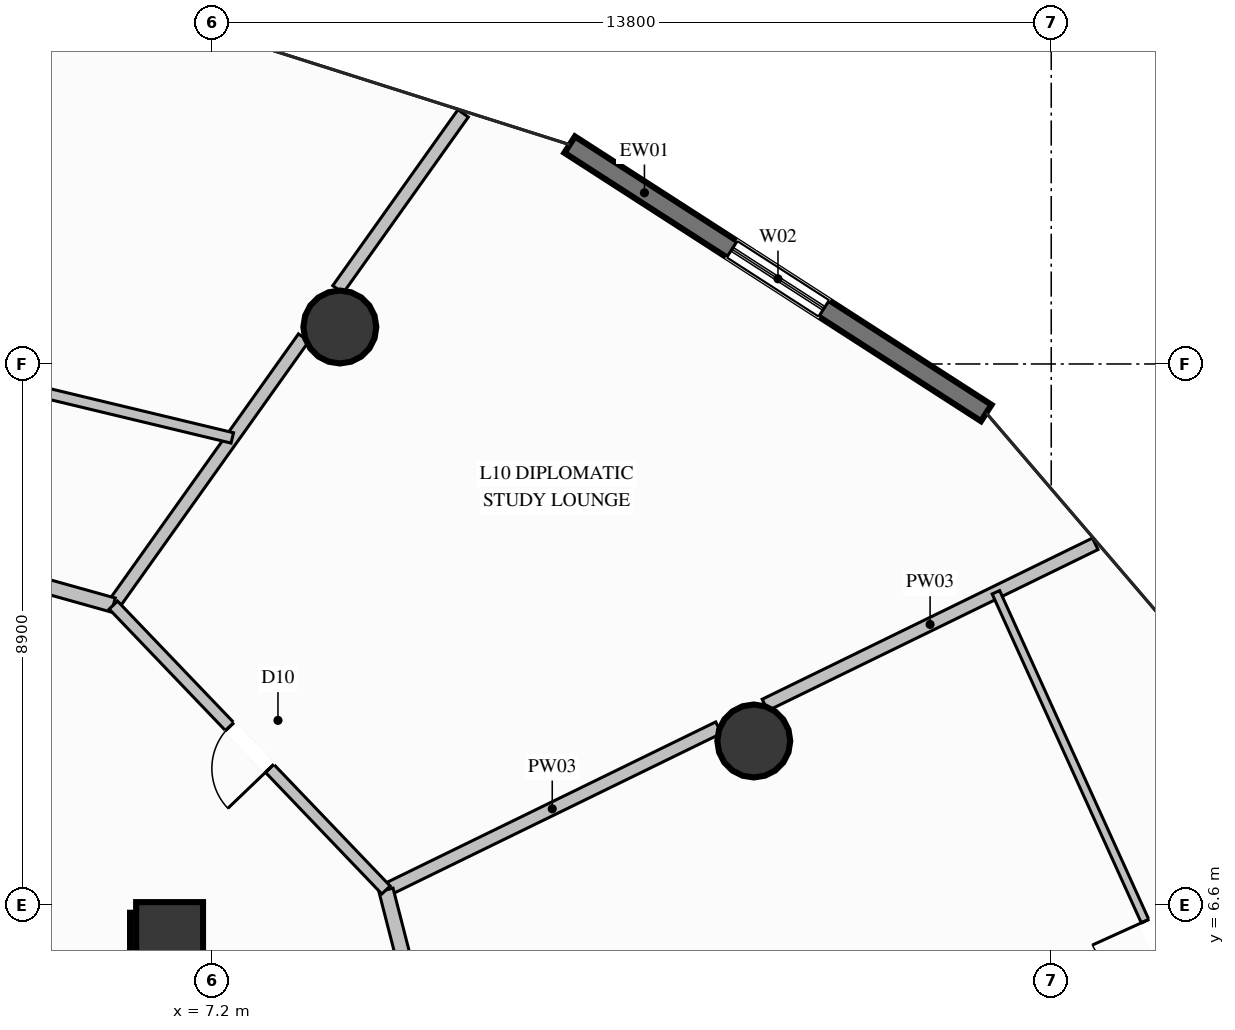
"""IFC4 building model, lengths in metres.
Left out: names, types, materials, properties, quantities, classifications, styles, units other than length and angle.
Written with IfcOpenShell. Run it as: python <this file> out.ifc"""

import sys

from ifc_helpers import new_model, si_unit, direction, frame, frame_2d, origin, origin_2d, place, context, subcontext, project, spatial, rectangle, circle, extrude, element, fill, save


model = new_model("IFC4")
c1 = context("Model", 3, precision=1e-05, world=origin(), true_north=direction((0.0, 1.0)))
c2 = subcontext(c1, "Body", "Model", "MODEL_VIEW")
j1 = project(units=[si_unit("LENGTHUNIT", "METRE"), si_unit("PLANEANGLEUNIT", "RADIAN")], contexts=[c1])
p1 = place(None, origin())
s1 = spatial("IfcSite", under=j1, at=p1, CompositionType="ELEMENT")
p2 = place(p1, origin())
s2 = spatial("IfcBuilding", under=s1, at=p2, CompositionType="ELEMENT")
p3 = place(p2, frame((0.0, 0.0, 46.4)))
s3 = spatial("IfcBuildingStorey", under=s2, at=p3, CompositionType="ELEMENT", Elevation=46.4)
p4 = place(p3, frame((6.5, 6.1, 0.0), z_axis=(0.0, 0.0, 1.0), x_axis=(1.0, 0.0, 0.0)))
e1 = element("IfcColumn", 1, at=p4, inside=s3, PredefinedType="COLUMN", context=c2, shape_type="SweptSolid", body=[
    extrude(rectangle(XDim=1.1, YDim=1.1, at=origin_2d()), origin(), (0.0, 0.0, 1.0), 3.6),
])
p5 = place(p3, frame((5.85, 6.1, 0.0), z_axis=(0.0, 0.0, 1.0), x_axis=(1.0, 0.0, 0.0)))
e2 = element("IfcWall", 2, at=p5, inside=s3, PredefinedType="SHEAR", context=c2, shape_type="SweptSolid", body=[
    extrude(rectangle(XDim=0.275, YDim=0.75, at=frame_2d((0.137, 0.0))), origin(), (0.0, 0.0, 1.0), 3.6),
])
p6 = place(p3, frame((6.5, 3.35, 0.0), z_axis=(0.0, 0.0, 1.0), x_axis=(0.0, 1.0, 0.0)))
e3 = element("IfcWall", 3, at=p6, inside=s3, PredefinedType="SHEAR", context=c2, shape_type="SweptSolid", body=[
    extrude(rectangle(XDim=3.125, YDim=0.75, at=frame_2d((1.562, 0.0))), origin(), (0.0, 0.0, 1.0), 3.6),
])
for number, where, z_axis, x_axis in (
    (4, (16.108, 9.3, 0.0), (0.0, 0.0, 1.0), (1.0, 0.0, 0.0)),
    (5, (9.3, 16.108, 0.0), (0.0, 0.0, 1.0), (1.0, 0.0, 0.0)),
):
    element("IfcColumn", number, at=place(p3, frame(where, z_axis=z_axis, x_axis=x_axis)), inside=s3, PredefinedType="COLUMN", context=c2, shape_type="SweptSolid", body=[
        extrude(circle(Radius=0.6, at=origin_2d()), origin(), (0.0, 0.0, 1.0), 3.6),
    ])
p7 = place(p3, frame((13.08, 19.107, 0.0), z_axis=(0.0, 0.0, 1.0), x_axis=(0.840690454994, -0.541515982111, 0.0)))
e6 = element("IfcWall", 6, at=p7, inside=s3, PredefinedType="SOLIDWALL", context=c2, shape_type="SweptSolid", body=[
    extrude(rectangle(XDim=8.149, YDim=0.32, at=frame_2d((4.075, 0.0))), origin(), (0.0, 0.0, 1.0), 3.34),
])
p8 = place(p7, frame((3.175, 0.0, 0.35)))
e7 = element("IfcOpeningElement", 7, at=p8, cuts=e6, PredefinedType="OPENING", context=c2, shape_type="SweptSolid", body=[
    extrude(rectangle(XDim=1.8, YDim=2.6, at=frame_2d((0.9, 1.3))), frame((0.0, 0.17, 0.0), z_axis=(0.0, -1.0, 0.0), x_axis=(1.0, 0.0, 0.0)), (0.0, 0.0, 1.0), 0.34),
])
p9 = place(p3, frame((10.059, 6.85, 0.0), z_axis=(0.0, 0.0, 1.0), x_axis=(0.898694403509, 0.438575385883, 0.0)))
e8 = element("IfcWall", 8, at=p9, inside=s3, PredefinedType="PARTITIONING", context=c2, shape_type="SweptSolid", body=[
    extrude(rectangle(XDim=6.085, YDim=0.21, at=frame_2d((3.043, 0.0))), origin(), (0.0, 0.0, 1.0), 2.709),
])
p10 = place(p3, frame((16.292, 9.892, 0.0), z_axis=(0.0, 0.0, 1.0), x_axis=(0.898724176439, 0.438514372266, 0.0)))
e9 = element("IfcWall", 9, at=p10, inside=s3, PredefinedType="PARTITIONING", context=c2, shape_type="SweptSolid", body=[
    extrude(rectangle(XDim=6.043, YDim=0.21, at=frame_2d((3.021, 0.0))), origin(), (0.0, 0.0, 1.0), 3.34),
])
p11 = place(p3, frame((5.575, 11.535, 0.0), z_axis=(0.0, 0.0, 1.0), x_axis=(0.579748671229, 0.814795359712, 0.0)))
e10 = element("IfcWall", 10, at=p11, inside=s3, PredefinedType="PARTITIONING", context=c2, shape_type="SweptSolid", body=[
    extrude(rectangle(XDim=5.399, YDim=0.21, at=frame_2d((2.7, 0.0))), origin(), (0.0, 0.0, 1.0), 2.709),
])
p12 = place(p3, frame((9.269, 16.727, 0.0), z_axis=(0.0, 0.0, 1.0), x_axis=(0.579683056025, 0.814842042704, 0.0)))
e11 = element("IfcWall", 11, at=p12, inside=s3, PredefinedType="PARTITIONING", context=c2, shape_type="SweptSolid", body=[
    extrude(rectangle(XDim=3.552, YDim=0.21, at=frame_2d((1.776, 0.0))), origin(), (0.0, 0.0, 1.0), 3.34),
])
p13 = place(p3, frame((5.575, 11.535, 0.0), z_axis=(0.0, 0.0, 1.0), x_axis=(-0.962983004146, 0.269562114782, 0.0)))
e12 = element("IfcWall", 12, at=p13, inside=s3, PredefinedType="PARTITIONING", context=c2, shape_type="SweptSolid", body=[
    extrude(rectangle(XDim=2.671, YDim=0.24, at=frame_2d((1.335, 0.0))), origin(), (0.0, 0.0, 1.0), 3.34),
])
p14 = place(p3, frame((7.531, 14.284, 0.0), z_axis=(0.0, 0.0, 1.0), x_axis=(-0.972350237733, 0.233527332836, 0.0)))
e13 = element("IfcWall", 13, at=p14, inside=s3, PredefinedType="PLUMBINGWALL", context=c2, shape_type="SweptSolid", body=[
    extrude(rectangle(XDim=3.409, YDim=0.175, at=frame_2d((1.705, 0.0))), origin(), (0.0, 0.0, 1.0), 3.34),
])
p15 = place(p3, frame((11.7, 0.45, 0.0), z_axis=(0.0, 0.0, 1.0), x_axis=(-0.248347790771, 0.968670932164, 0.0)))
e14 = element("IfcWall", 14, at=p15, inside=s3, PredefinedType="PARTITIONING", context=c2, shape_type="SweptSolid", body=[
    extrude(rectangle(XDim=6.607, YDim=0.24, at=frame_2d((3.304, 0.0))), origin(), (0.0, 0.0, 1.0), 3.34),
])
p16 = place(p3, frame((25.388, 0.063, 0.0), z_axis=(0.0, 0.0, 1.0), x_axis=(-0.413014096603, 0.910724632371, 0.0)))
e15 = element("IfcWall", 15, at=p16, inside=s3, PredefinedType="PARTITIONING", context=c2, shape_type="SweptSolid", body=[
    extrude(rectangle(XDim=12.827, YDim=0.135, at=frame_2d((6.414, 0.0))), origin(), (0.0, 0.0, 1.0), 3.34),
])
p17 = place(p16, frame((5.939, 0.0, 0.0)))
e16 = element("IfcOpeningElement", 16, at=p17, cuts=e15, PredefinedType="OPENING", context=c2, shape_type="SweptSolid", body=[
    extrude(rectangle(XDim=0.95, YDim=2.1, at=frame_2d((0.475, 1.05))), frame((0.0, 0.078, 0.0), z_axis=(0.0, -1.0, 0.0), x_axis=(1.0, 0.0, 0.0)), (0.0, 0.0, 1.0), 0.155),
])
p18 = place(p3, frame((10.059, 6.85, 0.0), z_axis=(0.0, 0.0, 1.0), x_axis=(-0.691464507588, 0.722410433719, 0.0)))
e17 = element("IfcWall", 17, at=p18, inside=s3, PredefinedType="PARTITIONING", context=c2, shape_type="SweptSolid", body=[
    extrude(rectangle(XDim=6.485, YDim=0.19, at=frame_2d((3.242, 0.0))), origin(), (0.0, 0.0, 1.0), 3.34),
])
p19 = place(p18, frame((2.768, 0.0, 0.0)))
e18 = element("IfcOpeningElement", 18, at=p19, cuts=e17, PredefinedType="OPENING", context=c2, shape_type="SweptSolid", body=[
    extrude(rectangle(XDim=0.95, YDim=2.1, at=frame_2d((0.475, 1.05))), frame((0.0, 0.105, 0.0), z_axis=(0.0, -1.0, 0.0), x_axis=(1.0, 0.0, 0.0)), (0.0, 0.0, 1.0), 0.21),
])
p20 = place(p8, origin())
e19 = element("IfcWindow", 19, at=p20, inside=s3, PartitioningType="SINGLE_PANEL", PredefinedType="WINDOW", context=c2, shape_type="SweptSolid", body=[
    extrude(rectangle(XDim=1.8, YDim=2.6, at=frame_2d((0.9, 1.3))), frame((0.0, 0.03, 0.0), z_axis=(0.0, -1.0, 0.0), x_axis=(1.0, 0.0, 0.0)), (0.0, 0.0, 1.0), 0.06),
])
fill(e7, e19)
p21 = place(p17, origin())
e20 = element("IfcDoor", 20, at=p21, inside=s3, OperationType="SINGLE_SWING_RIGHT", PredefinedType="DOOR", context=c2, shape_type="SweptSolid", body=[
    extrude(rectangle(XDim=0.95, YDim=2.1, at=frame_2d((0.475, 1.05))), frame((0.0, 0.025, 0.0), z_axis=(0.0, -1.0, 0.0), x_axis=(1.0, 0.0, 0.0)), (0.0, 0.0, 1.0), 0.05),
])
fill(e16, e20)
p22 = place(p19, origin())
e21 = element("IfcDoor", 21, at=p22, inside=s3, OperationType="SINGLE_SWING_LEFT", PredefinedType="DOOR", context=c2, shape_type="SweptSolid", body=[
    extrude(rectangle(XDim=0.95, YDim=2.1, at=frame_2d((0.475, 1.05))), frame((0.0, 0.025, 0.0), z_axis=(0.0, -1.0, 0.0), x_axis=(1.0, 0.0, 0.0)), (0.0, 0.0, 1.0), 0.05),
])
fill(e18, e21)
save(model, sys.argv[1])
